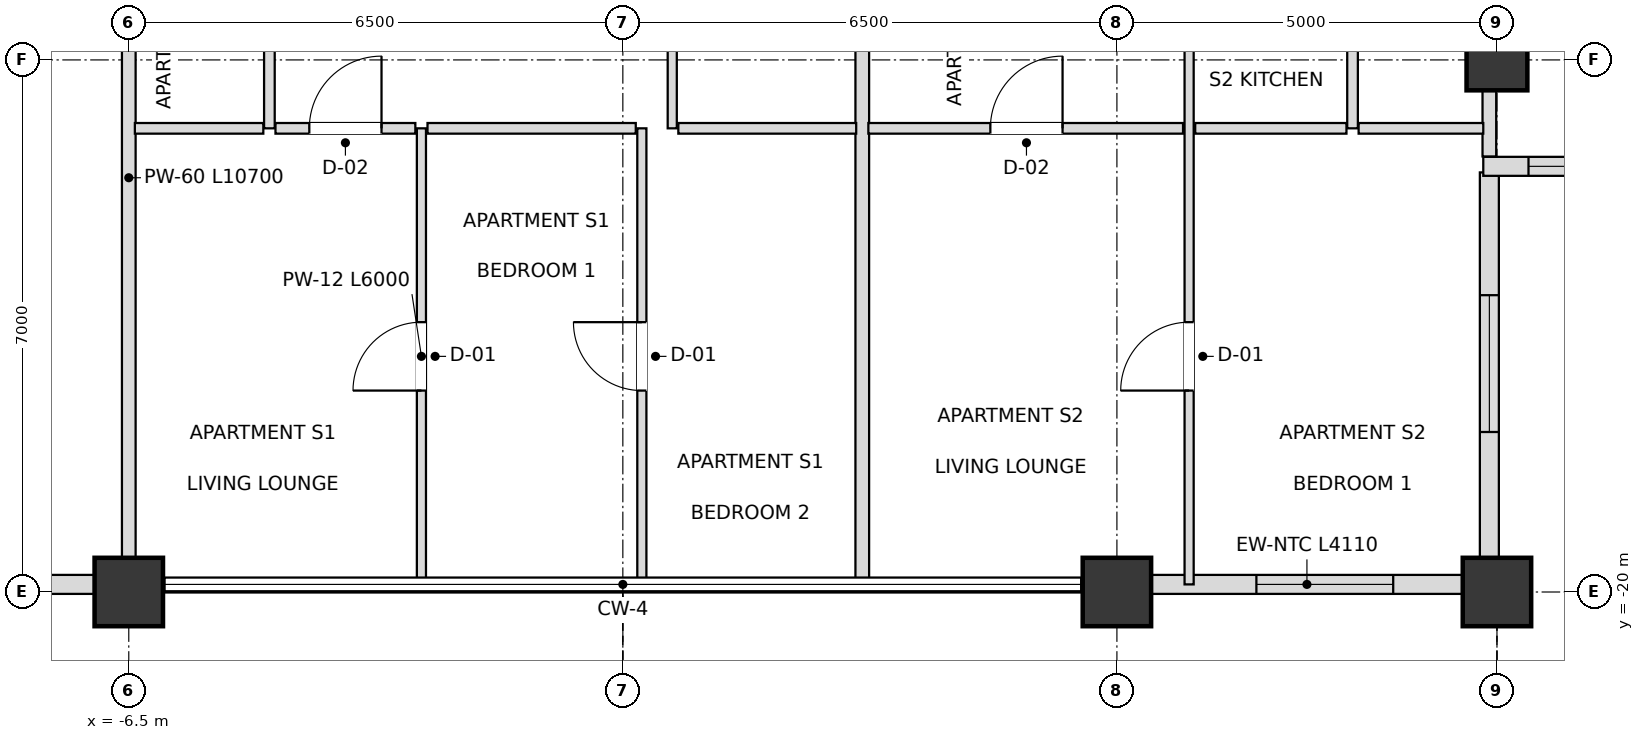
"""IFC4 building model, lengths in metres.
Left out: names, types, materials, properties, quantities, classifications, styles, units other than length and angle.
Written with IfcOpenShell. Run it as: python <this file> out.ifc"""

import sys

from ifc_helpers import new_model, si_unit, direction, frame, frame_2d, origin, origin_2d, place, context, subcontext, project, spatial, rectangle, extrude, element, fill, save


model = new_model("IFC4")
c1 = context("Model", 3, precision=1e-05, world=origin(), true_north=direction((0.0, 1.0)))
c2 = subcontext(c1, "Body", "Model", "MODEL_VIEW")
j1 = project(units=[si_unit("LENGTHUNIT", "METRE"), si_unit("PLANEANGLEUNIT", "RADIAN")], contexts=[c1])
p1 = place(None, origin())
s1 = spatial("IfcSite", under=j1, at=p1, CompositionType="ELEMENT")
p2 = place(p1, origin())
s2 = spatial("IfcBuilding", under=s1, at=p2, CompositionType="ELEMENT")
p3 = place(p2, frame((0.0, 0.0, 240.3)))
s3 = spatial("IfcBuildingStorey", under=s2, at=p3, CompositionType="ELEMENT", Elevation=240.3)
for number, where, z_axis, x_axis in (
    (1, (-6.5, -20.0, 0.0), (0.0, 0.0, 1.0), (1.0, 0.0, 0.0)),
    (2, (6.5, -20.0, 0.0), (0.0, 0.0, 1.0), (1.0, 0.0, 0.0)),
    (3, (11.5, -20.0, 0.0), (0.0, 0.0, 1.0), (1.0, 0.0, 0.0)),
):
    element("IfcColumn", number, at=place(p3, frame(where, z_axis=z_axis, x_axis=x_axis)), inside=s3, PredefinedType="USERDEFINED", context=c2, shape_type="SweptSolid", body=[
        extrude(rectangle(XDim=0.9, YDim=0.9, at=origin_2d()), origin(), (0.0, 0.0, 1.0), 3.6),
    ])
p4 = place(p3, frame((11.5, -13.0, 0.0), z_axis=(0.0, 0.0, 1.0), x_axis=(1.0, 0.0, 0.0)))
e4 = element("IfcColumn", 4, at=p4, inside=s3, PredefinedType="COLUMN", context=c2, shape_type="SweptSolid", body=[
    extrude(rectangle(XDim=0.8, YDim=0.8, at=origin_2d()), origin(), (0.0, 0.0, 1.0), 3.6),
])
p5 = place(p3, frame((-11.055, -19.9, 0.0), z_axis=(0.0, 0.0, 1.0), x_axis=(1.0, 0.0, 0.0)))
e5 = element("IfcWall", 5, at=p5, inside=s3, PredefinedType="SOLIDWALL", context=c2, shape_type="SweptSolid", body=[
    extrude(rectangle(XDim=4.11, YDim=0.25, at=frame_2d((2.055, 0.0))), origin(), (0.0, 0.0, 1.0), 2.748),
])
p6 = place(p5, frame((1.155, 0.0, 0.72)))
e6 = element("IfcOpeningElement", 6, at=p6, cuts=e5, PredefinedType="OPENING", context=c2, shape_type="SweptSolid", body=[
    extrude(rectangle(XDim=1.8, YDim=1.68, at=frame_2d((0.9, 0.84))), frame((0.0, 0.135, 0.0), z_axis=(0.0, -1.0, 0.0), x_axis=(1.0, 0.0, 0.0)), (0.0, 0.0, 1.0), 0.27),
])
p7 = place(p3, frame((6.945, -19.9, 0.0), z_axis=(0.0, 0.0, 1.0), x_axis=(1.0, 0.0, 0.0)))
e7 = element("IfcWall", 7, at=p7, inside=s3, PredefinedType="SOLIDWALL", context=c2, shape_type="SweptSolid", body=[
    extrude(rectangle(XDim=4.11, YDim=0.25, at=frame_2d((2.055, 0.0))), origin(), (0.0, 0.0, 1.0), 2.748),
])
p8 = place(p7, frame((1.39, 0.0, 0.72)))
e8 = element("IfcOpeningElement", 8, at=p8, cuts=e7, PredefinedType="OPENING", context=c2, shape_type="SweptSolid", body=[
    extrude(rectangle(XDim=1.8, YDim=1.68, at=frame_2d((0.9, 0.84))), frame((0.0, 0.135, 0.0), z_axis=(0.0, -1.0, 0.0), x_axis=(1.0, 0.0, 0.0)), (0.0, 0.0, 1.0), 0.27),
])
p9 = place(p3, frame((11.4, -19.82, 0.0), z_axis=(0.0, 0.0, 1.0), x_axis=(0.0, 1.0, 0.0)))
e9 = element("IfcWall", 9, at=p9, inside=s3, PredefinedType="SOLIDWALL", context=c2, shape_type="SweptSolid", body=[
    extrude(rectangle(XDim=5.34, YDim=0.25, at=frame_2d((2.67, 0.0))), origin(), (0.0, 0.0, 1.0), 2.748),
])
p10 = place(p9, frame((1.925, 0.0, 0.72)))
e10 = element("IfcOpeningElement", 10, at=p10, cuts=e9, PredefinedType="OPENING", context=c2, shape_type="SweptSolid", body=[
    extrude(rectangle(XDim=1.8, YDim=1.68, at=frame_2d((0.9, 0.84))), frame((0.0, 0.135, 0.0), z_axis=(0.0, -1.0, 0.0), x_axis=(1.0, 0.0, 0.0)), (0.0, 0.0, 1.0), 0.27),
])
p11 = place(p3, frame((11.32, -14.4, 0.0), z_axis=(0.0, 0.0, 1.0), x_axis=(1.0, 0.0, 0.0)))
e11 = element("IfcWall", 11, at=p11, inside=s3, PredefinedType="SOLIDWALL", context=c2, shape_type="SweptSolid", body=[
    extrude(rectangle(XDim=5.66, YDim=0.25, at=frame_2d((2.83, 0.0))), origin(), (0.0, 0.0, 1.0), 2.748),
])
p12 = place(p11, frame((0.595, 0.0, 0.72)))
e12 = element("IfcOpeningElement", 12, at=p12, cuts=e11, PredefinedType="OPENING", context=c2, shape_type="SweptSolid", body=[
    extrude(rectangle(XDim=1.8, YDim=1.68, at=frame_2d((0.9, 0.84))), frame((0.0, 0.135, 0.0), z_axis=(0.0, -1.0, 0.0), x_axis=(1.0, 0.0, 0.0)), (0.0, 0.0, 1.0), 0.27),
])
p13 = place(p11, frame((3.265, 0.0, 0.72)))
e13 = element("IfcOpeningElement", 13, at=p13, cuts=e11, PredefinedType="OPENING", context=c2, shape_type="SweptSolid", body=[
    extrude(rectangle(XDim=1.8, YDim=1.68, at=frame_2d((0.9, 0.84))), frame((0.0, 0.135, 0.0), z_axis=(0.0, -1.0, 0.0), x_axis=(1.0, 0.0, 0.0)), (0.0, 0.0, 1.0), 0.27),
])
p14 = place(p3, frame((-6.5, -19.9, 0.0), z_axis=(0.0, 0.0, 1.0), x_axis=(0.0, 1.0, 0.0)))
e14 = element("IfcWall", 14, at=p14, inside=s3, PredefinedType="PARTITIONING", context=c2, shape_type="SweptSolid", body=[
    extrude(rectangle(XDim=10.7, YDim=0.18, at=frame_2d((5.35, 0.0))), origin(), (0.0, 0.0, 1.0), 2.826),
])
p15 = place(p3, frame((-4.65, -13.9, 0.0), z_axis=(0.0, 0.0, 1.0), x_axis=(0.0, 1.0, 0.0)))
e15 = element("IfcWall", 15, at=p15, inside=s3, PredefinedType="PARTITIONING", context=c2, shape_type="SweptSolid", body=[
    extrude(rectangle(XDim=4.7, YDim=0.14, at=frame_2d((2.35, 0.0))), origin(), (0.0, 0.0, 1.0), 3.38),
])
p16 = place(p15, frame((1.9, 0.0, 0.0)))
e16 = element("IfcOpeningElement", 16, at=p16, cuts=e15, PredefinedType="OPENING", context=c2, shape_type="SweptSolid", body=[
    extrude(rectangle(XDim=0.9, YDim=2.1, at=frame_2d((0.45, 1.05))), frame((0.0, 0.08, 0.0), z_axis=(0.0, -1.0, 0.0), x_axis=(1.0, 0.0, 0.0)), (0.0, 0.0, 1.0), 0.16),
])
p17 = place(p3, frame((-2.65, -19.9, 0.0), z_axis=(0.0, 0.0, 1.0), x_axis=(0.0, 1.0, 0.0)))
e17 = element("IfcWall", 17, at=p17, inside=s3, PredefinedType="PARTITIONING", context=c2, shape_type="SweptSolid", body=[
    extrude(rectangle(XDim=6.0, YDim=0.12, at=frame_2d((3.0, 0.0))), origin(), (0.0, 0.0, 1.0), 3.018),
])
p18 = place(p17, frame((2.55, 0.0, 0.0)))
e18 = element("IfcOpeningElement", 18, at=p18, cuts=e17, PredefinedType="OPENING", context=c2, shape_type="SweptSolid", body=[
    extrude(rectangle(XDim=0.9, YDim=2.1, at=frame_2d((0.45, 1.05))), frame((0.0, 0.07, 0.0), z_axis=(0.0, -1.0, 0.0), x_axis=(1.0, 0.0, 0.0)), (0.0, 0.0, 1.0), 0.14),
])
p19 = place(p3, frame((0.25, -19.9, 0.0), z_axis=(0.0, 0.0, 1.0), x_axis=(0.0, 1.0, 0.0)))
e19 = element("IfcWall", 19, at=p19, inside=s3, PredefinedType="PARTITIONING", context=c2, shape_type="SweptSolid", body=[
    extrude(rectangle(XDim=6.0, YDim=0.12, at=frame_2d((3.0, 0.0))), origin(), (0.0, 0.0, 1.0), 3.018),
])
p20 = place(p19, frame((2.55, 0.0, 0.0)))
e20 = element("IfcOpeningElement", 20, at=p20, cuts=e19, PredefinedType="OPENING", context=c2, shape_type="SweptSolid", body=[
    extrude(rectangle(XDim=0.9, YDim=2.1, at=frame_2d((0.45, 1.05))), frame((0.0, 0.07, 0.0), z_axis=(0.0, -1.0, 0.0), x_axis=(1.0, 0.0, 0.0)), (0.0, 0.0, 1.0), 0.14),
])
p21 = place(p3, frame((0.65, -13.9, 0.0), z_axis=(0.0, 0.0, 1.0), x_axis=(0.0, 1.0, 0.0)))
e21 = element("IfcWall", 21, at=p21, inside=s3, PredefinedType="PARTITIONING", context=c2, shape_type="SweptSolid", body=[
    extrude(rectangle(XDim=4.7, YDim=0.12, at=frame_2d((2.35, 0.0))), origin(), (0.0, 0.0, 1.0), 3.38),
])
p22 = place(p21, frame((1.875, 0.0, 0.0)))
e22 = element("IfcOpeningElement", 22, at=p22, cuts=e21, PredefinedType="OPENING", context=c2, shape_type="SweptSolid", body=[
    extrude(rectangle(XDim=0.95, YDim=2.1, at=frame_2d((0.475, 1.05))), frame((0.0, 0.07, 0.0), z_axis=(0.0, -1.0, 0.0), x_axis=(1.0, 0.0, 0.0)), (0.0, 0.0, 1.0), 0.14),
])
p23 = place(p3, frame((3.15, -19.9, 0.0), z_axis=(0.0, 0.0, 1.0), x_axis=(0.0, 1.0, 0.0)))
e23 = element("IfcWall", 23, at=p23, inside=s3, PredefinedType="PARTITIONING", context=c2, shape_type="SweptSolid", body=[
    extrude(rectangle(XDim=10.7, YDim=0.18, at=frame_2d((5.35, 0.0))), origin(), (0.0, 0.0, 1.0), 3.018),
])
p24 = place(p3, frame((7.45, -19.9, 0.0), z_axis=(0.0, 0.0, 1.0), x_axis=(0.0, 1.0, 0.0)))
e24 = element("IfcWall", 24, at=p24, inside=s3, PredefinedType="PARTITIONING", context=c2, shape_type="SweptSolid", body=[
    extrude(rectangle(XDim=10.7, YDim=0.12, at=frame_2d((5.35, 0.0))), origin(), (0.0, 0.0, 1.0), 2.826),
])
p25 = place(p24, frame((7.875, 0.0, 0.0)))
e25 = element("IfcOpeningElement", 25, at=p25, cuts=e24, PredefinedType="OPENING", context=c2, shape_type="SweptSolid", body=[
    extrude(rectangle(XDim=0.95, YDim=2.1, at=frame_2d((0.475, 1.05))), frame((0.0, 0.07, 0.0), z_axis=(0.0, -1.0, 0.0), x_axis=(1.0, 0.0, 0.0)), (0.0, 0.0, 1.0), 0.14),
])
p26 = place(p24, frame((2.55, 0.0, 0.0)))
e26 = element("IfcOpeningElement", 26, at=p26, cuts=e24, PredefinedType="OPENING", context=c2, shape_type="SweptSolid", body=[
    extrude(rectangle(XDim=0.9, YDim=2.1, at=frame_2d((0.45, 1.05))), frame((0.0, 0.07, 0.0), z_axis=(0.0, -1.0, 0.0), x_axis=(1.0, 0.0, 0.0)), (0.0, 0.0, 1.0), 0.14),
])
p27 = place(p3, frame((9.6, -13.9, 0.0), z_axis=(0.0, 0.0, 1.0), x_axis=(0.0, 1.0, 0.0)))
e27 = element("IfcWall", 27, at=p27, inside=s3, PredefinedType="PARTITIONING", context=c2, shape_type="SweptSolid", body=[
    extrude(rectangle(XDim=4.7, YDim=0.14, at=frame_2d((2.35, 0.0))), origin(), (0.0, 0.0, 1.0), 2.826),
])
p28 = place(p27, frame((1.9, 0.0, 0.0)))
e28 = element("IfcOpeningElement", 28, at=p28, cuts=e27, PredefinedType="OPENING", context=c2, shape_type="SweptSolid", body=[
    extrude(rectangle(XDim=0.9, YDim=2.1, at=frame_2d((0.45, 1.05))), frame((0.0, 0.08, 0.0), z_axis=(0.0, -1.0, 0.0), x_axis=(1.0, 0.0, 0.0)), (0.0, 0.0, 1.0), 0.16),
])
p29 = place(p3, frame((11.4, -14.27, 0.0), z_axis=(0.0, 0.0, 1.0), x_axis=(0.0, 1.0, 0.0)))
e29 = element("IfcWall", 29, at=p29, inside=s3, PredefinedType="PARTITIONING", context=c2, shape_type="SweptSolid", body=[
    extrude(rectangle(XDim=5.07, YDim=0.18, at=frame_2d((2.535, 0.0))), origin(), (0.0, 0.0, 1.0), 2.748),
])
p30 = place(p3, frame((-6.42, -13.9, 0.0), z_axis=(0.0, 0.0, 1.0), x_axis=(1.0, 0.0, 0.0)))
e30 = element("IfcWall", 30, at=p30, inside=s3, PredefinedType="PARTITIONING", context=c2, shape_type="SweptSolid", body=[
    extrude(rectangle(XDim=1.69, YDim=0.14, at=frame_2d((0.845, 0.0))), origin(), (0.0, 0.0, 1.0), 3.38),
])
p31 = place(p3, frame((-4.57, -13.9, 0.0), z_axis=(0.0, 0.0, 1.0), x_axis=(1.0, 0.0, 0.0)))
e31 = element("IfcWall", 31, at=p31, inside=s3, PredefinedType="PARTITIONING", context=c2, shape_type="SweptSolid", body=[
    extrude(rectangle(XDim=1.84, YDim=0.14, at=frame_2d((0.92, 0.0))), origin(), (0.0, 0.0, 1.0), 3.38),
])
p32 = place(p31, frame((0.445, 0.0, 0.0)))
e32 = element("IfcOpeningElement", 32, at=p32, cuts=e31, PredefinedType="OPENING", context=c2, shape_type="SweptSolid", body=[
    extrude(rectangle(XDim=0.95, YDim=2.1, at=frame_2d((0.475, 1.05))), frame((0.0, 0.08, 0.0), z_axis=(0.0, -1.0, 0.0), x_axis=(1.0, 0.0, 0.0)), (0.0, 0.0, 1.0), 0.16),
])
p33 = place(p3, frame((-2.57, -13.9, 0.0), z_axis=(0.0, 0.0, 1.0), x_axis=(1.0, 0.0, 0.0)))
e33 = element("IfcWall", 33, at=p33, inside=s3, PredefinedType="PARTITIONING", context=c2, shape_type="SweptSolid", body=[
    extrude(rectangle(XDim=2.74, YDim=0.14, at=frame_2d((1.37, 0.0))), origin(), (0.0, 0.0, 1.0), 3.38),
])
p34 = place(p3, frame((0.73, -13.9, 0.0), z_axis=(0.0, 0.0, 1.0), x_axis=(1.0, 0.0, 0.0)))
e34 = element("IfcWall", 34, at=p34, inside=s3, PredefinedType="PARTITIONING", context=c2, shape_type="SweptSolid", body=[
    extrude(rectangle(XDim=2.34, YDim=0.14, at=frame_2d((1.17, 0.0))), origin(), (0.0, 0.0, 1.0), 3.38),
])
p35 = place(p3, frame((3.23, -13.9, 0.0), z_axis=(0.0, 0.0, 1.0), x_axis=(1.0, 0.0, 0.0)))
e35 = element("IfcWall", 35, at=p35, inside=s3, PredefinedType="PARTITIONING", context=c2, shape_type="SweptSolid", body=[
    extrude(rectangle(XDim=4.14, YDim=0.14, at=frame_2d((2.07, 0.0))), origin(), (0.0, 0.0, 1.0), 2.826),
])
p36 = place(p35, frame((1.605, 0.0, 0.0)))
e36 = element("IfcOpeningElement", 36, at=p36, cuts=e35, PredefinedType="OPENING", context=c2, shape_type="SweptSolid", body=[
    extrude(rectangle(XDim=0.95, YDim=2.1, at=frame_2d((0.475, 1.05))), frame((0.0, 0.08, 0.0), z_axis=(0.0, -1.0, 0.0), x_axis=(1.0, 0.0, 0.0)), (0.0, 0.0, 1.0), 0.16),
])
p37 = place(p3, frame((7.53, -13.9, 0.0), z_axis=(0.0, 0.0, 1.0), x_axis=(1.0, 0.0, 0.0)))
e37 = element("IfcWall", 37, at=p37, inside=s3, PredefinedType="PARTITIONING", context=c2, shape_type="SweptSolid", body=[
    extrude(rectangle(XDim=1.99, YDim=0.14, at=frame_2d((0.995, 0.0))), origin(), (0.0, 0.0, 1.0), 3.38),
])
p38 = place(p3, frame((9.68, -13.9, 0.0), z_axis=(0.0, 0.0, 1.0), x_axis=(1.0, 0.0, 0.0)))
e38 = element("IfcWall", 38, at=p38, inside=s3, PredefinedType="PARTITIONING", context=c2, shape_type="SweptSolid", body=[
    extrude(rectangle(XDim=1.64, YDim=0.14, at=frame_2d((0.82, 0.0))), origin(), (0.0, 0.0, 1.0), 3.38),
])
p39 = place(p8, origin())
e39 = element("IfcWindow", 39, at=p39, inside=s3, PartitioningType="SINGLE_PANEL", PredefinedType="WINDOW", context=c2, shape_type="SweptSolid", body=[
    extrude(rectangle(XDim=1.8, YDim=1.68, at=frame_2d((0.9, 0.84))), frame((0.0, 0.03, 0.0), z_axis=(0.0, -1.0, 0.0), x_axis=(1.0, 0.0, 0.0)), (0.0, 0.0, 1.0), 0.06),
])
fill(e8, e39)
p40 = place(p10, origin())
e40 = element("IfcWindow", 40, at=p40, inside=s3, PartitioningType="SINGLE_PANEL", PredefinedType="WINDOW", context=c2, shape_type="SweptSolid", body=[
    extrude(rectangle(XDim=1.8, YDim=1.68, at=frame_2d((0.9, 0.84))), frame((0.0, 0.03, 0.0), z_axis=(0.0, -1.0, 0.0), x_axis=(1.0, 0.0, 0.0)), (0.0, 0.0, 1.0), 0.06),
])
fill(e10, e40)
p41 = place(p12, origin())
e41 = element("IfcWindow", 41, at=p41, inside=s3, PartitioningType="SINGLE_PANEL", PredefinedType="WINDOW", context=c2, shape_type="SweptSolid", body=[
    extrude(rectangle(XDim=1.8, YDim=1.68, at=frame_2d((0.9, 0.84))), frame((0.0, 0.03, 0.0), z_axis=(0.0, -1.0, 0.0), x_axis=(1.0, 0.0, 0.0)), (0.0, 0.0, 1.0), 0.06),
])
fill(e12, e41)
p42 = place(p32, origin())
e42 = element("IfcDoor", 42, at=p42, inside=s3, OperationType="SINGLE_SWING_RIGHT", PredefinedType="DOOR", context=c2, shape_type="SweptSolid", body=[
    extrude(rectangle(XDim=0.95, YDim=2.1, at=frame_2d((0.475, 1.05))), frame((0.0, 0.025, 0.0), z_axis=(0.0, -1.0, 0.0), x_axis=(1.0, 0.0, 0.0)), (0.0, 0.0, 1.0), 0.05),
])
fill(e32, e42)
p43 = place(p18, origin())
e43 = element("IfcDoor", 43, at=p43, inside=s3, OperationType="SINGLE_SWING_LEFT", PredefinedType="DOOR", context=c2, shape_type="SweptSolid", body=[
    extrude(rectangle(XDim=0.9, YDim=2.1, at=frame_2d((0.45, 1.05))), frame((0.0, 0.025, 0.0), z_axis=(0.0, -1.0, 0.0), x_axis=(1.0, 0.0, 0.0)), (0.0, 0.0, 1.0), 0.05),
])
fill(e18, e43)
p44 = place(p20, origin())
e44 = element("IfcDoor", 44, at=p44, inside=s3, OperationType="SINGLE_SWING_RIGHT", PredefinedType="DOOR", context=c2, shape_type="SweptSolid", body=[
    extrude(rectangle(XDim=0.9, YDim=2.1, at=frame_2d((0.45, 1.05))), frame((0.0, 0.025, 0.0), z_axis=(0.0, -1.0, 0.0), x_axis=(1.0, 0.0, 0.0)), (0.0, 0.0, 1.0), 0.05),
])
fill(e20, e44)
p45 = place(p36, origin())
e45 = element("IfcDoor", 45, at=p45, inside=s3, OperationType="SINGLE_SWING_RIGHT", PredefinedType="DOOR", context=c2, shape_type="SweptSolid", body=[
    extrude(rectangle(XDim=0.95, YDim=2.1, at=frame_2d((0.475, 1.05))), frame((0.0, 0.025, 0.0), z_axis=(0.0, -1.0, 0.0), x_axis=(1.0, 0.0, 0.0)), (0.0, 0.0, 1.0), 0.05),
])
fill(e36, e45)
p46 = place(p26, origin())
e46 = element("IfcDoor", 46, at=p46, inside=s3, OperationType="SINGLE_SWING_LEFT", PredefinedType="DOOR", context=c2, shape_type="SweptSolid", body=[
    extrude(rectangle(XDim=0.9, YDim=2.1, at=frame_2d((0.45, 1.05))), frame((0.0, 0.025, 0.0), z_axis=(0.0, -1.0, 0.0), x_axis=(1.0, 0.0, 0.0)), (0.0, 0.0, 1.0), 0.05),
])
fill(e26, e46)
save(model, sys.argv[1])
